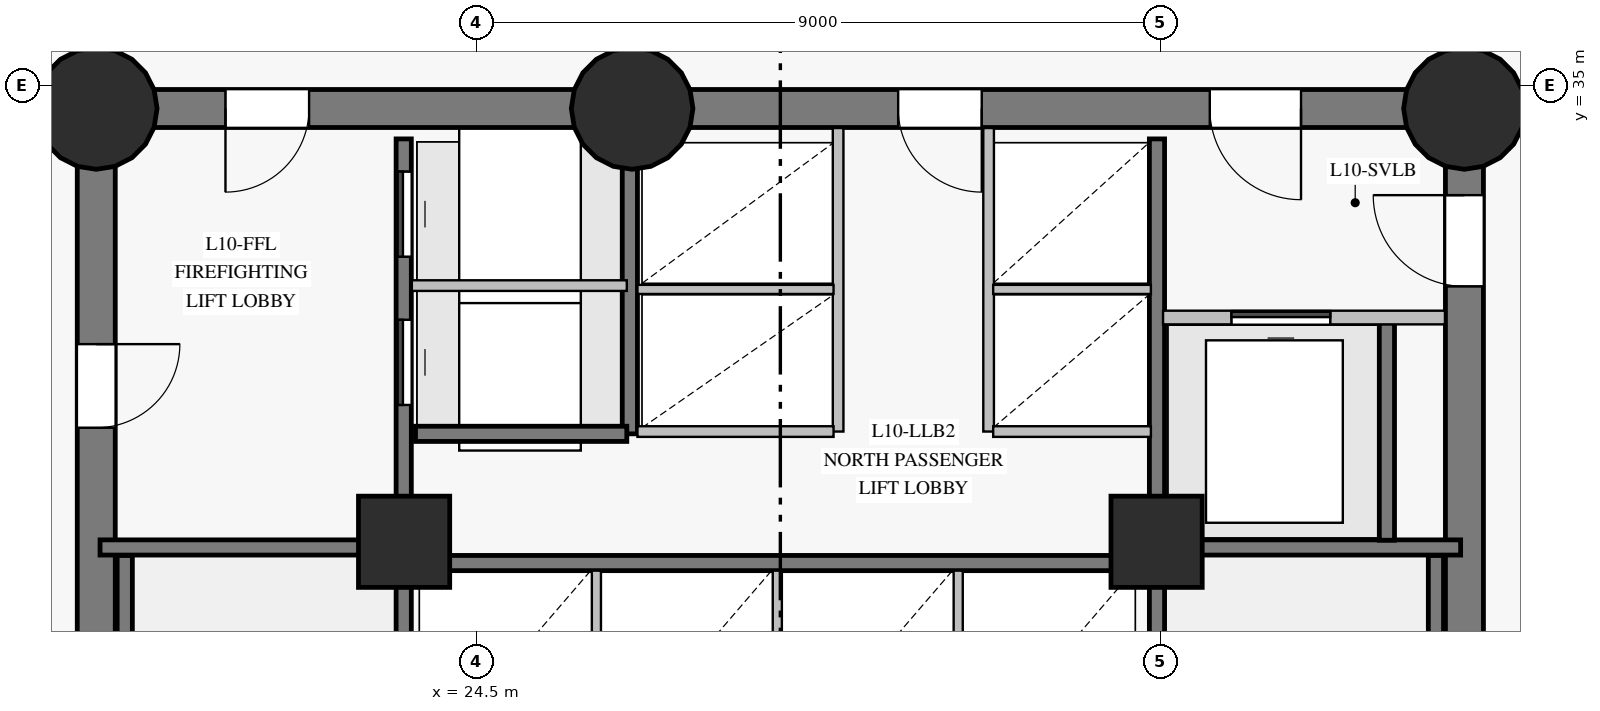
"""IFC4 building model, lengths in metres.
Left out: names, types, materials, properties, quantities, classifications, styles, units other than length and angle.
Written with IfcOpenShell. Run it as: python <this file> out.ifc"""

import sys

from ifc_helpers import new_model, si_unit, direction, frame, frame_2d, origin, origin_with_axes, origin_2d, place, context, subcontext, project, spatial, rectangle, circle, extrude, source, transform, mapped, element, fill, save


model = new_model("IFC4")
c1 = context("Model", 3, precision=1e-05, world=origin(), true_north=direction((0.0, 1.0)))
c2 = subcontext(c1, "Body", "Model", "MODEL_VIEW")
j1 = project(units=[si_unit("LENGTHUNIT", "METRE"), si_unit("PLANEANGLEUNIT", "RADIAN")], contexts=[c1])
p1 = place(None, origin())
s1 = spatial("IfcSite", under=j1, at=p1, CompositionType="ELEMENT")
p2 = place(p1, origin())
s2 = spatial("IfcBuilding", under=s1, at=p2, CompositionType="ELEMENT")
p3 = place(p2, frame((0.0, 0.0, 40.9)))
s3 = spatial("IfcBuildingStorey", under=s2, at=p3, CompositionType="ELEMENT", Elevation=40.9)
p4 = place(p3, frame((37.5, 18.3, 0.0), z_axis=(0.0, 0.0, 1.0), x_axis=(0.0, 1.0, 0.0)))
e1 = element("IfcWall", 1, at=p4, inside=s3, PredefinedType="SHEAR", context=c2, shape_type="SweptSolid", body=[
    extrude(rectangle(XDim=16.4, YDim=0.5, at=frame_2d((8.2, 0.0))), origin(), (0.0, 0.0, 1.0), 3.35),
])
p5 = place(p4, frame((14.06, 0.0, 0.0)))
e2 = element("IfcOpeningElement", 2, at=p5, cuts=e1, PredefinedType="OPENING", context=c2, shape_type="SweptSolid", body=[
    extrude(rectangle(XDim=1.2, YDim=2.15, at=frame_2d((0.6, 1.075))), frame((0.0, 0.26, 0.0), z_axis=(0.0, -1.0, 0.0), x_axis=(1.0, 0.0, 0.0)), (0.0, 0.0, 1.0), 0.52),
])
p6 = place(p3, frame((37.5, 34.7, 0.0), z_axis=(0.0, 0.0, 1.0), x_axis=(-1.0, 0.0, 0.0)))
e3 = element("IfcWall", 3, at=p6, inside=s3, PredefinedType="SHEAR", context=c2, shape_type="SweptSolid", body=[
    extrude(rectangle(XDim=10.95, YDim=0.5, at=frame_2d((5.475, 0.0))), origin(), (0.0, 0.0, 1.0), 3.35),
])
p7 = place(p6, frame((2.15, 0.0, 0.0)))
e4 = element("IfcOpeningElement", 4, at=p7, cuts=e3, PredefinedType="OPENING", context=c2, shape_type="SweptSolid", body=[
    extrude(rectangle(XDim=1.2, YDim=2.15, at=frame_2d((0.6, 1.075))), frame((0.0, 0.26, 0.0), z_axis=(0.0, -1.0, 0.0), x_axis=(1.0, 0.0, 0.0)), (0.0, 0.0, 1.0), 0.52),
])
p8 = place(p6, frame((6.35, 0.0, 0.0)))
e5 = element("IfcOpeningElement", 5, at=p8, cuts=e3, PredefinedType="OPENING", context=c2, shape_type="SweptSolid", body=[
    extrude(rectangle(XDim=1.1, YDim=2.15, at=frame_2d((0.55, 1.075))), frame((0.0, 0.26, 0.0), z_axis=(0.0, -1.0, 0.0), x_axis=(1.0, 0.0, 0.0)), (0.0, 0.0, 1.0), 0.52),
])
p9 = place(p3, frame((26.55, 34.7, 0.0), z_axis=(0.0, 0.0, 1.0), x_axis=(-1.0, 0.0, 0.0)))
e6 = element("IfcWall", 6, at=p9, inside=s3, PredefinedType="SHEAR", context=c2, shape_type="SweptSolid", body=[
    extrude(rectangle(XDim=7.05, YDim=0.5, at=frame_2d((3.525, 0.0))), origin(), (0.0, 0.0, 1.0), 3.35),
])
p10 = place(p9, frame((4.25, 0.0, 0.0)))
e7 = element("IfcOpeningElement", 7, at=p10, cuts=e6, PredefinedType="OPENING", context=c2, shape_type="SweptSolid", body=[
    extrude(rectangle(XDim=1.1, YDim=2.15, at=frame_2d((0.55, 1.075))), frame((0.0, 0.26, 0.0), z_axis=(0.0, -1.0, 0.0), x_axis=(1.0, 0.0, 0.0)), (0.0, 0.0, 1.0), 0.52),
])
p11 = place(p3, frame((19.5, 34.7, 0.0), z_axis=(0.0, 0.0, 1.0), x_axis=(0.0, -1.0, 0.0)))
e8 = element("IfcWall", 8, at=p11, inside=s3, PredefinedType="SHEAR", context=c2, shape_type="SweptSolid", body=[
    extrude(rectangle(XDim=16.4, YDim=0.5, at=frame_2d((8.2, 0.0))), origin(), (0.0, 0.0, 1.0), 3.35),
])
p12 = place(p11, frame((3.1, 0.0, 0.0)))
e9 = element("IfcOpeningElement", 9, at=p12, cuts=e8, PredefinedType="OPENING", context=c2, shape_type="SweptSolid", body=[
    extrude(rectangle(XDim=1.1, YDim=2.15, at=frame_2d((0.55, 1.075))), frame((0.0, 0.26, 0.0), z_axis=(0.0, -1.0, 0.0), x_axis=(1.0, 0.0, 0.0)), (0.0, 0.0, 1.0), 0.52),
])
m1 = source(origin_with_axes(), c2, "Body", "SweptSolid", [
    extrude(circle(Radius=0.8, at=origin_2d()), origin(), (0.0, 0.0, 1.0), 3.6),
])
for number, where, z_axis, x_axis in (
    (10, (19.5, 34.7, 0.0), (0.0, 0.0, 1.0), (1.0, 0.0, 0.0)),
    (11, (26.55, 34.7, 0.0), (0.0, 0.0, 1.0), (1.0, 0.0, 0.0)),
    (12, (37.5, 34.7, 0.0), (0.0, 0.0, 1.0), (1.0, 0.0, 0.0)),
):
    element("IfcColumn", number, at=place(p3, frame(where, z_axis=z_axis, x_axis=x_axis)), inside=s3, PredefinedType="COLUMN", context=c2, shape_type="MappedRepresentation", body=[
        mapped(m1, transform((0.0, 0.0, 0.0), scale=1.0)),
    ])
m2 = source(origin_with_axes(), c2, "Body", "SweptSolid", [
    extrude(rectangle(XDim=1.2, YDim=1.2, at=origin_2d()), origin(), (0.0, 0.0, 1.0), 3.6),
])
for number, where, z_axis, x_axis in (
    (13, (23.55, 29.0, 0.0), (0.0, 0.0, 1.0), (1.0, 0.0, 0.0)),
    (14, (33.45, 29.0, 0.0), (0.0, 0.0, 1.0), (1.0, 0.0, 0.0)),
):
    element("IfcColumn", number, at=place(p3, frame(where, z_axis=z_axis, x_axis=x_axis)), inside=s3, PredefinedType="COLUMN", context=c2, shape_type="MappedRepresentation", body=[
        mapped(m2, transform((0.0, 0.0, 0.0), scale=1.0)),
    ])
p13 = place(p3, frame((23.545, 18.7, 0.0), z_axis=(0.0, 0.0, 1.0), x_axis=(0.0, 1.0, 0.0)))
e15 = element("IfcWall", 15, at=p13, inside=s3, PredefinedType="SHEAR", context=c2, shape_type="SweptSolid", body=[
    extrude(rectangle(XDim=15.6, YDim=0.2, at=frame_2d((7.8, 0.0))), origin(), (0.0, 0.0, 1.0), 3.35),
])
p14 = place(p13, frame((2.75, 0.0, 0.0)))
e16 = element("IfcOpeningElement", 16, at=p14, cuts=e15, PredefinedType="OPENING", context=c2, shape_type="SweptSolid", body=[
    extrude(rectangle(XDim=1.15, YDim=2.15, at=frame_2d((0.575, 1.075))), frame((0.0, 0.11, 0.0), z_axis=(0.0, -1.0, 0.0), x_axis=(1.0, 0.0, 0.0)), (0.0, 0.0, 1.0), 0.22),
])
p15 = place(p13, frame((0.14, 0.0, 0.0)))
e17 = element("IfcOpeningElement", 17, at=p15, cuts=e15, PredefinedType="OPENING", context=c2, shape_type="SweptSolid", body=[
    extrude(rectangle(XDim=0.88, YDim=2.1, at=frame_2d((0.44, 1.05))), frame((0.0, 0.11, 0.0), z_axis=(0.0, -1.0, 0.0), x_axis=(1.0, 0.0, 0.0)), (0.0, 0.0, 1.0), 0.22),
])
p16 = place(p13, frame((1.36, 0.0, 0.0)))
e18 = element("IfcOpeningElement", 18, at=p16, cuts=e15, PredefinedType="OPENING", context=c2, shape_type="SweptSolid", body=[
    extrude(rectangle(XDim=0.88, YDim=2.1, at=frame_2d((0.44, 1.05))), frame((0.0, 0.11, 0.0), z_axis=(0.0, -1.0, 0.0), x_axis=(1.0, 0.0, 0.0)), (0.0, 0.0, 1.0), 0.22),
])
p17 = place(p13, frame((12.1, 0.0, 0.0)))
e19 = element("IfcOpeningElement", 19, at=p17, cuts=e15, PredefinedType="OPENING", context=c2, shape_type="SweptSolid", body=[
    extrude(rectangle(XDim=1.12, YDim=2.15, at=frame_2d((0.56, 1.075))), frame((0.0, 0.11, 0.0), z_axis=(0.0, -1.0, 0.0), x_axis=(1.0, 0.0, 0.0)), (0.0, 0.0, 1.0), 0.22),
])
p18 = place(p13, frame((14.05, 0.0, 0.0)))
e20 = element("IfcOpeningElement", 20, at=p18, cuts=e15, PredefinedType="OPENING", context=c2, shape_type="SweptSolid", body=[
    extrude(rectangle(XDim=1.12, YDim=2.15, at=frame_2d((0.56, 1.075))), frame((0.0, 0.11, 0.0), z_axis=(0.0, -1.0, 0.0), x_axis=(1.0, 0.0, 0.0)), (0.0, 0.0, 1.0), 0.22),
])
p19 = place(p3, frame((33.455, 18.7, 0.0), z_axis=(0.0, 0.0, 1.0), x_axis=(0.0, 1.0, 0.0)))
e21 = element("IfcWall", 21, at=p19, inside=s3, PredefinedType="SHEAR", context=c2, shape_type="SweptSolid", body=[
    extrude(rectangle(XDim=15.6, YDim=0.2, at=frame_2d((7.8, 0.0))), origin(), (0.0, 0.0, 1.0), 3.35),
])
p20 = place(p19, frame((2.75, 0.0, 0.0)))
e22 = element("IfcOpeningElement", 22, at=p20, cuts=e21, PredefinedType="OPENING", context=c2, shape_type="SweptSolid", body=[
    extrude(rectangle(XDim=1.15, YDim=2.15, at=frame_2d((0.575, 1.075))), frame((0.0, 0.11, 0.0), z_axis=(0.0, -1.0, 0.0), x_axis=(1.0, 0.0, 0.0)), (0.0, 0.0, 1.0), 0.22),
])
p21 = place(p19, frame((0.55, 0.0, 0.0)))
e23 = element("IfcOpeningElement", 23, at=p21, cuts=e21, PredefinedType="OPENING", context=c2, shape_type="SweptSolid", body=[
    extrude(rectangle(XDim=0.94, YDim=2.1, at=frame_2d((0.47, 1.05))), frame((0.0, 0.11, 0.0), z_axis=(0.0, -1.0, 0.0), x_axis=(1.0, 0.0, 0.0)), (0.0, 0.0, 1.0), 0.22),
])
p22 = place(p3, frame((23.7, 28.72, 0.0), z_axis=(0.0, 0.0, 1.0), x_axis=(1.0, 0.0, 0.0)))
e24 = element("IfcWall", 24, at=p22, inside=s3, PredefinedType="SHEAR", context=c2, shape_type="SweptSolid", body=[
    extrude(rectangle(XDim=9.6, YDim=0.2, at=frame_2d((4.8, 0.0))), origin(), (0.0, 0.0, 1.0), 3.35),
])
for number, where, z_axis, x_axis in (
    (25, (19.875, 21.32, 0.0), (0.0, 0.0, 1.0), (0.0, 1.0, 0.0)),
    (26, (37.125, 21.32, 0.0), (0.0, 0.0, 1.0), (0.0, 1.0, 0.0)),
):
    element("IfcWall", number, at=place(p3, frame(where, z_axis=z_axis, x_axis=x_axis)), inside=s3, PredefinedType="SHEAR", context=c2, shape_type="SweptSolid", body=[
        extrude(rectangle(XDim=7.5, YDim=0.2, at=frame_2d((3.75, 0.0))), origin(), (0.0, 0.0, 1.0), 3.35),
    ])
for number, where, z_axis, x_axis in (
    (27, (33.455, 28.925, 0.0), (0.0, 0.0, 1.0), (1.0, 0.0, 0.0)),
    (28, (19.55, 28.925, 0.0), (0.0, 0.0, 1.0), (1.0, 0.0, 0.0)),
):
    element("IfcWall", number, at=place(p3, frame(where, z_axis=z_axis, x_axis=x_axis)), inside=s3, PredefinedType="SHEAR", context=c2, shape_type="SweptSolid", body=[
        extrude(rectangle(XDim=3.995, YDim=0.2, at=frame_2d((1.998, 0.0))), origin(), (0.0, 0.0, 1.0), 3.35),
    ])
p23 = place(p3, frame((26.52, 30.42, 0.0), z_axis=(0.0, 0.0, 1.0), x_axis=(0.0, 1.0, 0.0)))
e29 = element("IfcWall", 29, at=p23, inside=s3, PredefinedType="SHEAR", context=c2, shape_type="SweptSolid", body=[
    extrude(rectangle(XDim=3.86, YDim=0.2, at=frame_2d((1.93, 0.0))), origin(), (0.0, 0.0, 1.0), 3.35),
])
p24 = place(p3, frame((36.48, 29.02, 0.0), z_axis=(0.0, 0.0, 1.0), x_axis=(0.0, 1.0, 0.0)))
e30 = element("IfcWall", 30, at=p24, inside=s3, PredefinedType="SHEAR", context=c2, shape_type="SweptSolid", body=[
    extrude(rectangle(XDim=2.86, YDim=0.2, at=frame_2d((1.43, 0.0))), origin(), (0.0, 0.0, 1.0), 3.35),
])
p25 = place(p3, frame((23.7, 30.42, 0.0), z_axis=(0.0, 0.0, 1.0), x_axis=(1.0, 0.0, 0.0)))
e31 = element("IfcWall", 31, at=p25, inside=s3, PredefinedType="SHEAR", context=c2, shape_type="SweptSolid", body=[
    extrude(rectangle(XDim=2.78, YDim=0.2, at=frame_2d((1.39, 0.0))), origin(), (0.0, 0.0, 1.0), 3.35),
])
for number, where, z_axis, x_axis in (
    (32, (29.26, 30.45, 0.0), (0.0, 0.0, 1.0), (0.0, 1.0, 0.0)),
    (33, (31.24, 30.45, 0.0), (0.0, 0.0, 1.0), (0.0, 1.0, 0.0)),
):
    element("IfcWall", number, at=place(p3, frame(where, z_axis=z_axis, x_axis=x_axis)), inside=s3, PredefinedType="PARTITIONING", context=c2, shape_type="SweptSolid", body=[
        extrude(rectangle(XDim=3.993, YDim=0.14, at=frame_2d((1.997, 0.0))), origin(), (0.0, 0.0, 1.0), 3.35),
    ])
p26 = place(p3, frame((33.535, 31.95, 0.0), z_axis=(0.0, 0.0, 1.0), x_axis=(1.0, 0.0, 0.0)))
e34 = element("IfcWall", 34, at=p26, inside=s3, PredefinedType="PARTITIONING", context=c2, shape_type="SweptSolid", body=[
    extrude(rectangle(XDim=3.709, YDim=0.18, at=frame_2d((1.854, 0.0))), origin(), (0.0, 0.0, 1.0), 3.35),
])
p27 = place(p26, frame((0.9, 0.0, 0.0)))
e35 = element("IfcOpeningElement", 35, at=p27, cuts=e34, PredefinedType="OPENING", context=c2, shape_type="SweptSolid", body=[
    extrude(rectangle(XDim=1.3, YDim=2.2, at=frame_2d((0.65, 1.1))), frame((0.0, 0.1, 0.0), z_axis=(0.0, -1.0, 0.0), x_axis=(1.0, 0.0, 0.0)), (0.0, 0.0, 1.0), 0.2),
])
p28 = place(p3, frame((23.652, 32.37, 0.0), z_axis=(0.0, 0.0, 1.0), x_axis=(1.0, 0.0, 0.0)))
e36 = element("IfcWall", 36, at=p28, inside=s3, PredefinedType="PARTITIONING", context=c2, shape_type="SweptSolid", body=[
    extrude(rectangle(XDim=2.828, YDim=0.14, at=frame_2d((1.414, 0.0))), origin(), (0.0, 0.0, 1.0), 3.35),
])
for number, where, z_axis, x_axis in (
    (37, (26.08, 26.02, 0.0), (0.0, 0.0, 1.0), (0.0, 1.0, 0.0)),
    (38, (28.46, 26.02, 0.0), (0.0, 0.0, 1.0), (0.0, 1.0, 0.0)),
    (39, (30.84, 26.02, 0.0), (0.0, 0.0, 1.0), (0.0, 1.0, 0.0)),
):
    element("IfcWall", number, at=place(p3, frame(where, z_axis=z_axis, x_axis=x_axis)), inside=s3, PredefinedType="PARTITIONING", context=c2, shape_type="SweptSolid", body=[
        extrude(rectangle(XDim=2.6, YDim=0.12, at=frame_2d((1.3, 0.0))), origin(), (0.0, 0.0, 1.0), 3.35),
    ])
p29 = place(p3, frame((26.62, 30.45, 0.0), z_axis=(0.0, 0.0, 1.0), x_axis=(1.0, 0.0, 0.0)))
e40 = element("IfcWall", 40, at=p29, inside=s3, PredefinedType="PARTITIONING", context=c2, shape_type="SweptSolid", body=[
    extrude(rectangle(XDim=2.58, YDim=0.14, at=frame_2d((1.29, 0.0))), origin(), (0.0, 0.0, 1.0), 3.35),
])
p30 = place(p3, frame((26.62, 32.32, 0.0), z_axis=(0.0, 0.0, 1.0), x_axis=(1.0, 0.0, 0.0)))
e41 = element("IfcWall", 41, at=p30, inside=s3, PredefinedType="PARTITIONING", context=c2, shape_type="SweptSolid", body=[
    extrude(rectangle(XDim=2.58, YDim=0.12, at=frame_2d((1.29, 0.0))), origin(), (0.0, 0.0, 1.0), 3.35),
])
p31 = place(p3, frame((31.3, 30.45, 0.0), z_axis=(0.0, 0.0, 1.0), x_axis=(1.0, 0.0, 0.0)))
e42 = element("IfcWall", 42, at=p31, inside=s3, PredefinedType="PARTITIONING", context=c2, shape_type="SweptSolid", body=[
    extrude(rectangle(XDim=2.075, YDim=0.14, at=frame_2d((1.038, 0.0))), origin(), (0.0, 0.0, 1.0), 3.35),
])
p32 = place(p3, frame((31.3, 32.32, 0.0), z_axis=(0.0, 0.0, 1.0), x_axis=(1.0, 0.0, 0.0)))
e43 = element("IfcWall", 43, at=p32, inside=s3, PredefinedType="PARTITIONING", context=c2, shape_type="SweptSolid", body=[
    extrude(rectangle(XDim=2.075, YDim=0.12, at=frame_2d((1.038, 0.0))), origin(), (0.0, 0.0, 1.0), 3.35),
])
m3 = source(origin_with_axes(), c2, "Body", "SweptSolid", [
    extrude(rectangle(XDim=1.1, YDim=2.15, at=frame_2d((0.55, 1.075))), frame((0.0, 0.025, 0.0), z_axis=(0.0, -1.0, 0.0), x_axis=(1.0, 0.0, 0.0)), (0.0, 0.0, 1.0), 0.05),
])
p33 = place(p10, origin())
e44 = element("IfcDoor", 44, at=p33, inside=s3, OperationType="SINGLE_SWING_RIGHT", PredefinedType="DOOR", context=c2, shape_type="MappedRepresentation", body=[
    mapped(m3, transform((0.0, 0.0, 0.0), scale=1.0)),
])
fill(e7, e44)
p34 = place(p12, origin())
e45 = element("IfcDoor", 45, at=p34, inside=s3, OperationType="SINGLE_SWING_LEFT", PredefinedType="DOOR", context=c2, shape_type="MappedRepresentation", body=[
    mapped(m3, transform((0.0, 0.0, 0.0), scale=1.0)),
])
fill(e9, e45)
m4 = source(origin_with_axes(), c2, "Body", "SweptSolid", [
    extrude(rectangle(XDim=1.2, YDim=2.15, at=frame_2d((0.6, 1.075))), frame((0.0, 0.025, 0.0), z_axis=(0.0, -1.0, 0.0), x_axis=(1.0, 0.0, 0.0)), (0.0, 0.0, 1.0), 0.05),
])
p35 = place(p5, origin())
e46 = element("IfcDoor", 46, at=p35, inside=s3, OperationType="SINGLE_SWING_RIGHT", PredefinedType="DOOR", context=c2, shape_type="MappedRepresentation", body=[
    mapped(m4, transform((0.0, 0.0, 0.0), scale=1.0)),
])
fill(e2, e46)
p36 = place(p7, origin())
e47 = element("IfcDoor", 47, at=p36, inside=s3, OperationType="SINGLE_SWING_LEFT", PredefinedType="DOOR", context=c2, shape_type="MappedRepresentation", body=[
    mapped(m4, transform((0.0, 0.0, 0.0), scale=1.0)),
])
fill(e4, e47)
m5 = source(origin_with_axes(), c2, "Body", "SweptSolid", [
    extrude(rectangle(XDim=1.3, YDim=2.2, at=frame_2d((0.65, 1.1))), frame((0.0, 0.025, 0.0), z_axis=(0.0, -1.0, 0.0), x_axis=(1.0, 0.0, 0.0)), (0.0, 0.0, 1.0), 0.05),
])
p37 = place(p27, origin())
e48 = element("IfcDoor", 48, at=p37, inside=s3, OperationType="SLIDING_TO_LEFT", PredefinedType="DOOR", context=c2, shape_type="MappedRepresentation", body=[
    mapped(m5, transform((0.0, 0.0, 0.0), scale=1.0)),
])
fill(e35, e48)
p38 = place(p8, origin())
e49 = element("IfcDoor", 49, at=p38, inside=s3, OperationType="SINGLE_SWING_LEFT", PredefinedType="DOOR", context=c2, shape_type="MappedRepresentation", body=[
    mapped(m3, transform((0.0, 0.0, 0.0), scale=1.0)),
])
fill(e5, e49)
m6 = source(origin_with_axes(), c2, "Body", "SweptSolid", [
    extrude(rectangle(XDim=1.12, YDim=2.15, at=frame_2d((0.56, 1.075))), frame((0.0, 0.025, 0.0), z_axis=(0.0, -1.0, 0.0), x_axis=(1.0, 0.0, 0.0)), (0.0, 0.0, 1.0), 0.05),
])
p39 = place(p17, origin())
e50 = element("IfcDoor", 50, at=p39, inside=s3, OperationType="SLIDING_TO_LEFT", PredefinedType="DOOR", context=c2, shape_type="MappedRepresentation", body=[
    mapped(m6, transform((0.0, 0.0, 0.0), scale=1.0)),
])
fill(e19, e50)
p40 = place(p18, origin())
e51 = element("IfcDoor", 51, at=p40, inside=s3, OperationType="SLIDING_TO_RIGHT", PredefinedType="DOOR", context=c2, shape_type="MappedRepresentation", body=[
    mapped(m6, transform((0.0, 0.0, 0.0), scale=1.0)),
])
fill(e20, e51)
save(model, sys.argv[1])
